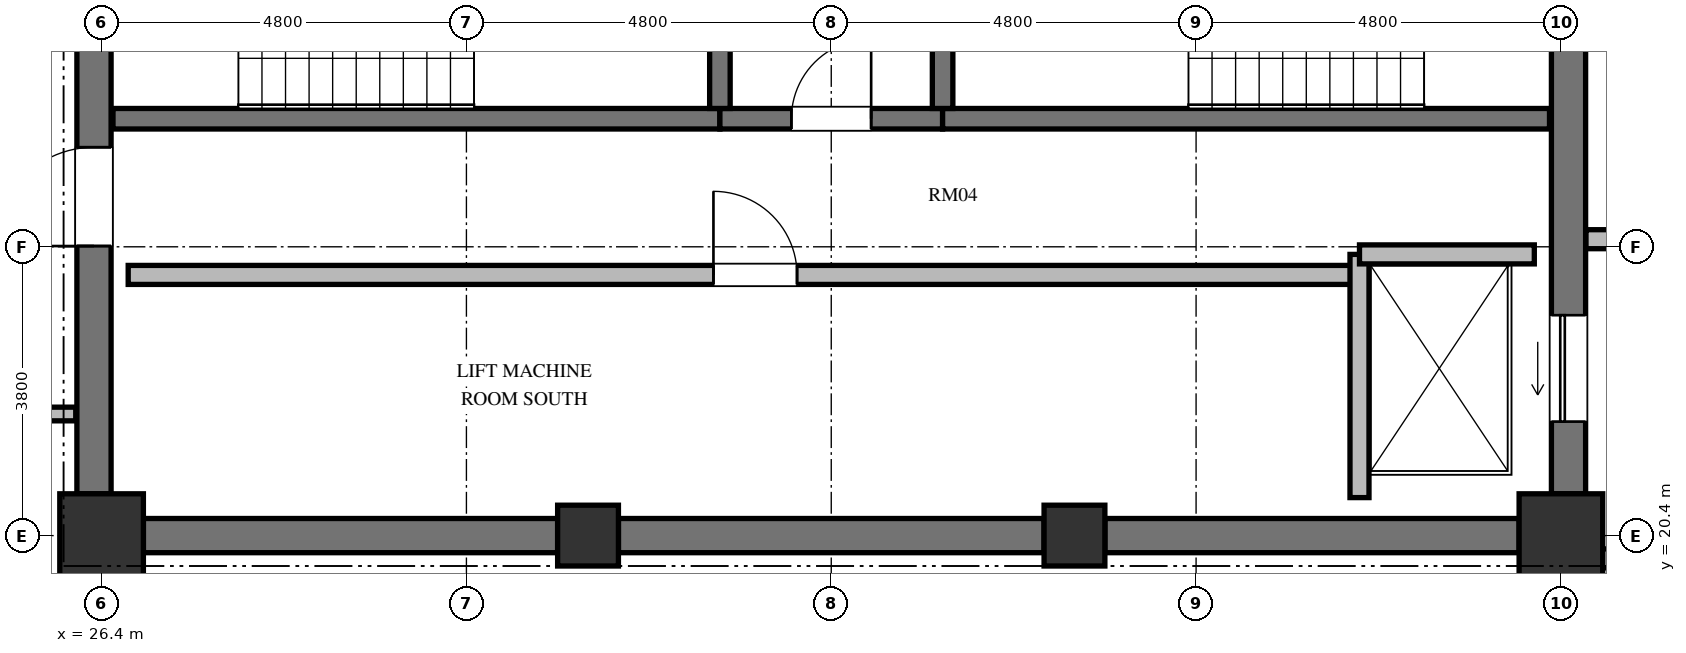
"""IFC4 building model, lengths in metres.
Left out: names, types, materials, properties, quantities, classifications, styles, units other than length and angle.
Written with IfcOpenShell. Run it as: python <this file> out.ifc"""

import sys

from ifc_helpers import new_model, si_unit, direction, frame, frame_2d, origin, origin_2d, place, context, subcontext, project, spatial, rectangle, extrude, element, fill, save


model = new_model("IFC4")
c1 = context("Model", 3, precision=1e-05, world=origin(), true_north=direction((0.0, 1.0)))
c2 = subcontext(c1, "Body", "Model", "MODEL_VIEW")
j1 = project(units=[si_unit("LENGTHUNIT", "METRE"), si_unit("PLANEANGLEUNIT", "RADIAN")], contexts=[c1])
p1 = place(None, origin())
s1 = spatial("IfcSite", under=j1, at=p1, CompositionType="ELEMENT")
p2 = place(p1, origin())
s2 = spatial("IfcBuilding", under=s1, at=p2, CompositionType="ELEMENT")
p3 = place(p2, frame((0.0, 0.0, 312.612)))
s3 = spatial("IfcBuildingStorey", under=s2, at=p3, CompositionType="ELEMENT", Elevation=312.612)
p4 = place(p3, frame((26.4, 20.4, 0.0), z_axis=(0.0, 0.0, 1.0), x_axis=(1.0, 0.0, 0.0)))
e1 = element("IfcColumn", 1, at=p4, inside=s3, PredefinedType="COLUMN", context=c2, shape_type="SweptSolid", body=[
    extrude(rectangle(XDim=1.1, YDim=1.1, at=origin_2d()), origin(), (0.0, 0.0, 1.0), 3.388),
])
for number, where, z_axis, x_axis in (
    (2, (32.8, 20.4, 0.0), (0.0, 0.0, 1.0), (1.0, 0.0, 0.0)),
    (3, (39.2, 20.4, 0.0), (0.0, 0.0, 1.0), (1.0, 0.0, 0.0)),
):
    element("IfcColumn", number, at=place(p3, frame(where, z_axis=z_axis, x_axis=x_axis)), inside=s3, PredefinedType="COLUMN", context=c2, shape_type="SweptSolid", body=[
        extrude(rectangle(XDim=0.8, YDim=0.8, at=origin_2d()), origin(), (0.0, 0.0, 1.0), 3.388),
    ])
p5 = place(p3, frame((45.6, 20.4, 0.0), z_axis=(0.0, 0.0, 1.0), x_axis=(1.0, 0.0, 0.0)))
e4 = element("IfcColumn", 4, at=p5, inside=s3, PredefinedType="COLUMN", context=c2, shape_type="SweptSolid", body=[
    extrude(rectangle(XDim=1.1, YDim=1.1, at=origin_2d()), origin(), (0.0, 0.0, 1.0), 3.388),
])
p6 = place(p3, frame((26.3, 20.95, 0.0), z_axis=(0.0, 0.0, 1.0), x_axis=(0.0, 1.0, 0.0)))
e5 = element("IfcWall", 5, at=p6, inside=s3, PredefinedType="SHEAR", context=c2, shape_type="SweptSolid", body=[
    extrude(rectangle(XDim=14.1, YDim=0.45, at=frame_2d((7.05, 0.0))), origin(), (0.0, 0.0, 1.0), 3.388),
])
p7 = place(p6, frame((6.5, 0.0, 0.0)))
e6 = element("IfcOpeningElement", 6, at=p7, cuts=e5, PredefinedType="OPENING", context=c2, shape_type="SweptSolid", body=[
    extrude(rectangle(XDim=1.2, YDim=2.15, at=frame_2d((0.6, 1.075))), frame((0.0, 0.235, 0.0), z_axis=(0.0, -1.0, 0.0), x_axis=(1.0, 0.0, 0.0)), (0.0, 0.0, 1.0), 0.47),
])
p8 = place(p6, frame((9.6, 0.0, 0.0)))
e7 = element("IfcOpeningElement", 7, at=p8, cuts=e5, PredefinedType="OPENING", context=c2, shape_type="SweptSolid", body=[
    extrude(rectangle(XDim=1.3, YDim=2.2, at=frame_2d((0.65, 1.1))), frame((0.0, 0.235, 0.0), z_axis=(0.0, -1.0, 0.0), x_axis=(1.0, 0.0, 0.0)), (0.0, 0.0, 1.0), 0.47),
])
p9 = place(p6, frame((3.26, 0.0, 0.0)))
e8 = element("IfcOpeningElement", 8, at=p9, cuts=e5, PredefinedType="OPENING", context=c2, shape_type="SweptSolid", body=[
    extrude(rectangle(XDim=1.3, YDim=2.2, at=frame_2d((0.65, 1.1))), frame((0.0, 0.235, 0.0), z_axis=(0.0, -1.0, 0.0), x_axis=(1.0, 0.0, 0.0)), (0.0, 0.0, 1.0), 0.47),
])
p10 = place(p3, frame((45.7, 20.95, 0.0), z_axis=(0.0, 0.0, 1.0), x_axis=(0.0, 1.0, 0.0)))
e9 = element("IfcWall", 9, at=p10, inside=s3, PredefinedType="SHEAR", context=c2, shape_type="SweptSolid", body=[
    extrude(rectangle(XDim=14.1, YDim=0.45, at=frame_2d((7.05, 0.0))), origin(), (0.0, 0.0, 1.0), 3.388),
])
p11 = place(p10, frame((11.75, 0.0, 0.0)))
e10 = element("IfcOpeningElement", 10, at=p11, cuts=e9, PredefinedType="OPENING", context=c2, shape_type="SweptSolid", body=[
    extrude(rectangle(XDim=1.4, YDim=2.3, at=frame_2d((0.7, 1.15))), frame((0.0, 0.235, 0.0), z_axis=(0.0, -1.0, 0.0), x_axis=(1.0, 0.0, 0.0)), (0.0, 0.0, 1.0), 0.47),
])
p12 = place(p10, frame((0.95, 0.0, 0.0)))
e11 = element("IfcOpeningElement", 11, at=p12, cuts=e9, PredefinedType="OPENING", context=c2, shape_type="SweptSolid", body=[
    extrude(rectangle(XDim=1.4, YDim=2.3, at=frame_2d((0.7, 1.15))), frame((0.0, 0.235, 0.0), z_axis=(0.0, -1.0, 0.0), x_axis=(1.0, 0.0, 0.0)), (0.0, 0.0, 1.0), 0.47),
])
p13 = place(p10, frame((9.48, 0.0, 0.0)))
e12 = element("IfcOpeningElement", 12, at=p13, cuts=e9, PredefinedType="OPENING", context=c2, shape_type="SweptSolid", body=[
    extrude(rectangle(XDim=1.1, YDim=2.15, at=frame_2d((0.55, 1.075))), frame((0.0, 0.235, 0.0), z_axis=(0.0, -1.0, 0.0), x_axis=(1.0, 0.0, 0.0)), (0.0, 0.0, 1.0), 0.47),
])
p14 = place(p3, frame((26.95, 20.4, 0.0), z_axis=(0.0, 0.0, 1.0), x_axis=(1.0, 0.0, 0.0)))
e13 = element("IfcWall", 13, at=p14, inside=s3, PredefinedType="SHEAR", context=c2, shape_type="SweptSolid", body=[
    extrude(rectangle(XDim=5.45, YDim=0.45, at=frame_2d((2.725, 0.0))), origin(), (0.0, 0.0, 1.0), 3.388),
])
p15 = place(p3, frame((33.2, 20.4, 0.0), z_axis=(0.0, 0.0, 1.0), x_axis=(1.0, 0.0, 0.0)))
e14 = element("IfcWall", 14, at=p15, inside=s3, PredefinedType="SHEAR", context=c2, shape_type="SweptSolid", body=[
    extrude(rectangle(XDim=5.6, YDim=0.45, at=frame_2d((2.8, 0.0))), origin(), (0.0, 0.0, 1.0), 3.388),
])
p16 = place(p3, frame((39.6, 20.4, 0.0), z_axis=(0.0, 0.0, 1.0), x_axis=(1.0, 0.0, 0.0)))
e15 = element("IfcWall", 15, at=p16, inside=s3, PredefinedType="SHEAR", context=c2, shape_type="SweptSolid", body=[
    extrude(rectangle(XDim=5.45, YDim=0.45, at=frame_2d((2.725, 0.0))), origin(), (0.0, 0.0, 1.0), 3.388),
])
p17 = place(p3, frame((26.55, 25.885, 0.0), z_axis=(0.0, 0.0, 1.0), x_axis=(1.0, 0.0, 0.0)))
e16 = element("IfcWall", 16, at=p17, inside=s3, PredefinedType="SHEAR", context=c2, shape_type="SweptSolid", body=[
    extrude(rectangle(XDim=7.985, YDim=0.27, at=frame_2d((3.992, 0.0))), origin(), (0.0, 0.0, 1.0), 3.388),
])
p18 = place(p3, frame((34.535, 25.885, 0.0), z_axis=(0.0, 0.0, 1.0), x_axis=(1.0, 0.0, 0.0)))
e17 = element("IfcWall", 17, at=p18, inside=s3, PredefinedType="SHEAR", context=c2, shape_type="SweptSolid", body=[
    extrude(rectangle(XDim=2.93, YDim=0.27, at=frame_2d((1.465, 0.0))), origin(), (0.0, 0.0, 1.0), 3.388),
])
p19 = place(p18, frame((0.94, 0.0, 0.0)))
e18 = element("IfcOpeningElement", 18, at=p19, cuts=e17, PredefinedType="OPENING", context=c2, shape_type="SweptSolid", body=[
    extrude(rectangle(XDim=1.05, YDim=2.15, at=frame_2d((0.525, 1.075))), frame((0.0, 0.145, 0.0), z_axis=(0.0, -1.0, 0.0), x_axis=(1.0, 0.0, 0.0)), (0.0, 0.0, 1.0), 0.29),
])
p20 = place(p3, frame((37.465, 25.885, 0.0), z_axis=(0.0, 0.0, 1.0), x_axis=(1.0, 0.0, 0.0)))
e19 = element("IfcWall", 19, at=p20, inside=s3, PredefinedType="SHEAR", context=c2, shape_type="SweptSolid", body=[
    extrude(rectangle(XDim=7.985, YDim=0.27, at=frame_2d((3.992, 0.0))), origin(), (0.0, 0.0, 1.0), 3.388),
])
for number, where, z_axis, x_axis in (
    (20, (34.535, 26.02, 0.0), (0.0, 0.0, 1.0), (0.0, 1.0, 0.0)),
    (21, (37.465, 26.02, 0.0), (0.0, 0.0, 1.0), (0.0, 1.0, 0.0)),
):
    element("IfcWall", number, at=place(p3, frame(where, z_axis=z_axis, x_axis=x_axis)), inside=s3, PredefinedType="SHEAR", context=c2, shape_type="SweptSolid", body=[
        extrude(rectangle(XDim=4.08, YDim=0.27, at=frame_2d((2.04, 0.0))), origin(), (0.0, 0.0, 1.0), 3.388),
    ])
p21 = place(p3, frame((26.75, 23.83, 0.0), z_axis=(0.0, 0.0, 1.0), x_axis=(1.0, 0.0, 0.0)))
e22 = element("IfcWall", 22, at=p21, inside=s3, PredefinedType="SOLIDWALL", context=c2, shape_type="SweptSolid", body=[
    extrude(rectangle(XDim=16.2, YDim=0.25, at=frame_2d((8.1, 0.0))), origin(), (0.0, 0.0, 1.0), 3.008),
])
p22 = place(p21, frame((7.7, 0.0, 0.0)))
e23 = element("IfcOpeningElement", 23, at=p22, cuts=e22, PredefinedType="OPENING", context=c2, shape_type="SweptSolid", body=[
    extrude(rectangle(XDim=1.1, YDim=2.15, at=frame_2d((0.55, 1.075))), frame((0.0, 0.135, 0.0), z_axis=(0.0, -1.0, 0.0), x_axis=(1.0, 0.0, 0.0)), (0.0, 0.0, 1.0), 0.27),
])
p23 = place(p3, frame((42.95, 20.9, 0.0), z_axis=(0.0, 0.0, 1.0), x_axis=(0.0, 1.0, 0.0)))
e24 = element("IfcWall", 24, at=p23, inside=s3, PredefinedType="SOLIDWALL", context=c2, shape_type="SweptSolid", body=[
    extrude(rectangle(XDim=3.2, YDim=0.25, at=frame_2d((1.6, 0.0))), origin(), (0.0, 0.0, 1.0), 3.008),
])
p24 = place(p3, frame((42.95, 24.1, 0.0), z_axis=(0.0, 0.0, 1.0), x_axis=(1.0, 0.0, 0.0)))
e25 = element("IfcWall", 25, at=p24, inside=s3, PredefinedType="SOLIDWALL", context=c2, shape_type="SweptSolid", body=[
    extrude(rectangle(XDim=2.3, YDim=0.25, at=frame_2d((1.15, 0.0))), origin(), (0.0, 0.0, 1.0), 3.008),
])
for number, where, z_axis, x_axis in (
    (26, (45.93, 24.3, 0.0), (0.0, 0.0, 1.0), (1.0, 0.0, 0.0)),
    (27, (45.93, 20.1, 0.0), (0.0, 0.0, 1.0), (1.0, 0.0, 0.0)),
):
    element("IfcWall", number, at=place(p3, frame(where, z_axis=z_axis, x_axis=x_axis)), inside=s3, PredefinedType="SOLIDWALL", context=c2, shape_type="SweptSolid", body=[
        extrude(rectangle(XDim=2.52, YDim=0.25, at=frame_2d((1.26, 0.0))), origin(), (0.0, 0.0, 1.0), 3.008),
    ])
p25 = place(p3, frame((26.06, 22.0, 0.0), z_axis=(0.0, 0.0, 1.0), x_axis=(-1.0, 0.0, 0.0)))
e28 = element("IfcWall", 28, at=p25, inside=s3, PredefinedType="PARTITIONING", context=c2, shape_type="SweptSolid", body=[
    extrude(rectangle(XDim=2.447, YDim=0.18, at=frame_2d((1.223, 0.0))), origin(), (0.0, 0.0, 1.0), 3.008),
])
p26 = place(p19, origin())
e29 = element("IfcDoor", 29, at=p26, inside=s3, OperationType="SINGLE_SWING_RIGHT", PredefinedType="DOOR", context=c2, shape_type="SweptSolid", body=[
    extrude(rectangle(XDim=1.05, YDim=2.15, at=frame_2d((0.525, 1.075))), frame((0.0, 0.025, 0.0), z_axis=(0.0, -1.0, 0.0), x_axis=(1.0, 0.0, 0.0)), (0.0, 0.0, 1.0), 0.05),
])
fill(e18, e29)
p27 = place(p9, origin())
e30 = element("IfcDoor", 30, at=p27, inside=s3, OperationType="SINGLE_SWING_LEFT", PredefinedType="DOOR", context=c2, shape_type="SweptSolid", body=[
    extrude(rectangle(XDim=1.3, YDim=2.2, at=frame_2d((0.65, 1.1))), frame((0.0, 0.025, 0.0), z_axis=(0.0, -1.0, 0.0), x_axis=(1.0, 0.0, 0.0)), (0.0, 0.0, 1.0), 0.05),
])
fill(e8, e30)
p28 = place(p22, origin())
e31 = element("IfcDoor", 31, at=p28, inside=s3, OperationType="SINGLE_SWING_LEFT", PredefinedType="DOOR", context=c2, shape_type="SweptSolid", body=[
    extrude(rectangle(XDim=1.1, YDim=2.15, at=frame_2d((0.55, 1.075))), frame((0.0, 0.025, 0.0), z_axis=(0.0, -1.0, 0.0), x_axis=(1.0, 0.0, 0.0)), (0.0, 0.0, 1.0), 0.05),
])
fill(e23, e31)
p29 = place(p12, origin())
e32 = element("IfcDoor", 32, at=p29, inside=s3, OperationType="SLIDING_TO_LEFT", PredefinedType="DOOR", context=c2, shape_type="SweptSolid", body=[
    extrude(rectangle(XDim=1.4, YDim=2.3, at=frame_2d((0.7, 1.15))), frame((0.0, 0.025, 0.0), z_axis=(0.0, -1.0, 0.0), x_axis=(1.0, 0.0, 0.0)), (0.0, 0.0, 1.0), 0.05),
])
fill(e11, e32)
save(model, sys.argv[1])
